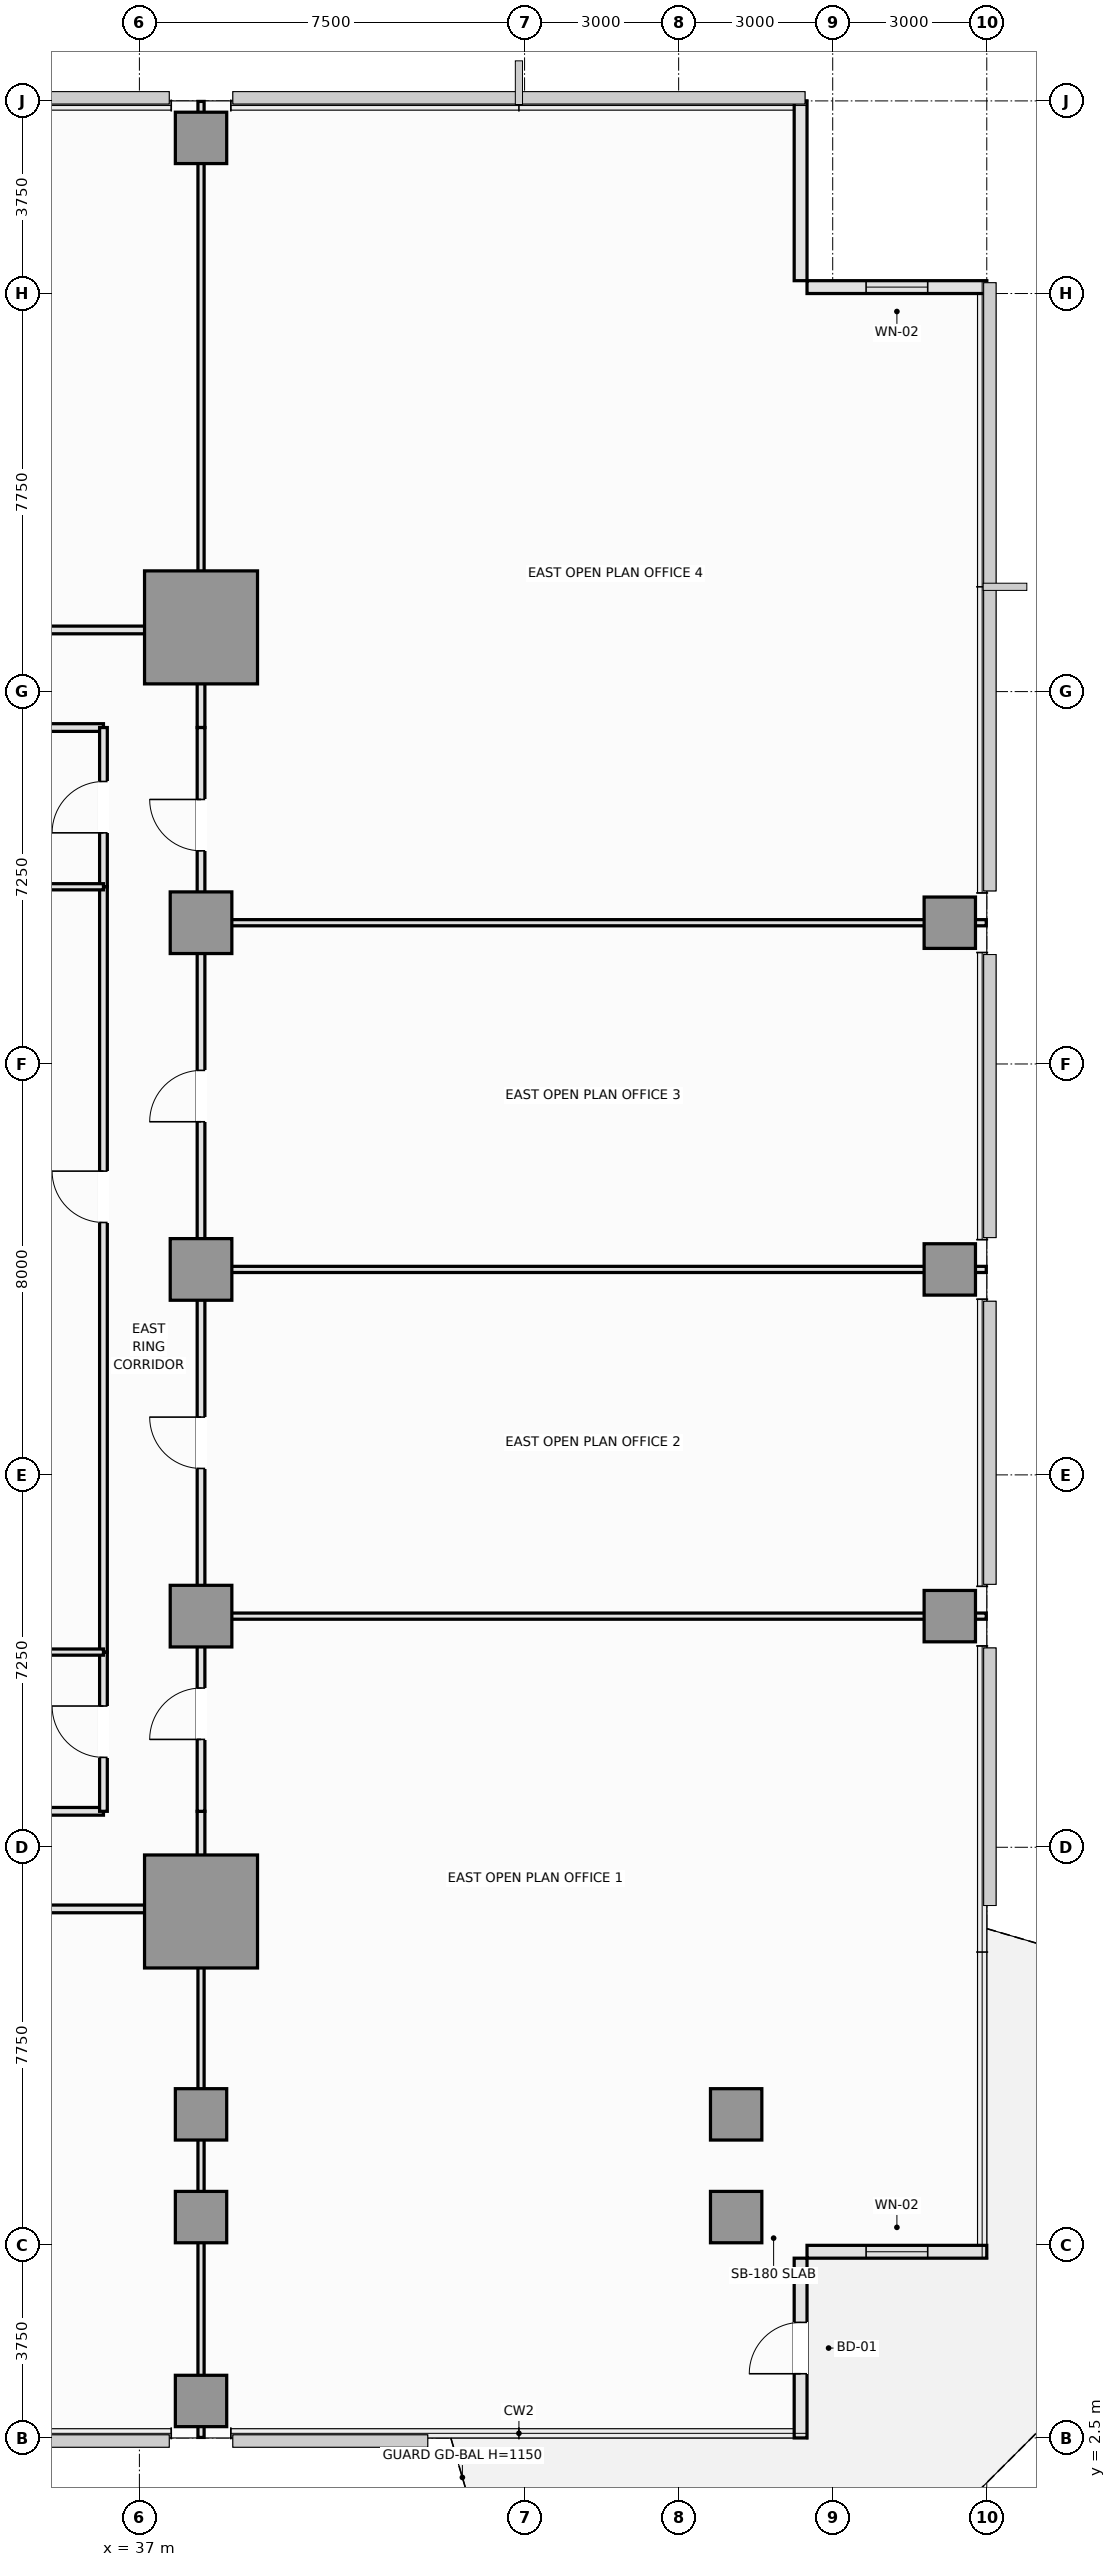
"""IFC4 building model, lengths in metres.
Left out: names, types, materials, properties, quantities, classifications, styles, units other than length and angle.
Written with IfcOpenShell. Run it as: python <this file> out.ifc"""

import sys

from ifc_helpers import new_model, si_unit, direction, frame, frame_2d, origin, origin_2d, place, context, subcontext, project, spatial, rectangle, extrude, element, fill, save


model = new_model("IFC4")
c1 = context("Model", 3, precision=1e-05, world=origin(), true_north=direction((0.0, 1.0)))
c2 = subcontext(c1, "Body", "Model", "MODEL_VIEW")
j1 = project(units=[si_unit("LENGTHUNIT", "METRE"), si_unit("PLANEANGLEUNIT", "RADIAN")], contexts=[c1])
p1 = place(None, origin())
s1 = spatial("IfcSite", under=j1, at=p1, CompositionType="ELEMENT")
p2 = place(p1, origin())
s2 = spatial("IfcBuilding", under=s1, at=p2, CompositionType="ELEMENT")
p3 = place(p2, frame((0.0, 0.0, 32.7)))
s3 = spatial("IfcBuildingStorey", under=s2, at=p3, CompositionType="ELEMENT", Elevation=32.7)
for number, where, z_axis, x_axis in (
    (1, (38.2, 12.75, 0.0), (0.0, 0.0, 1.0), (1.0, 0.0, 0.0)),
    (2, (38.2, 37.75, 0.0), (0.0, 0.0, 1.0), (1.0, 0.0, 0.0)),
):
    element("IfcColumn", number, at=place(p3, frame(where, z_axis=z_axis, x_axis=x_axis)), inside=s3, PredefinedType="COLUMN", context=c2, shape_type="SweptSolid", body=[
        extrude(rectangle(XDim=2.2, YDim=2.2, at=origin_2d()), origin(), (0.0, 0.0, 1.0), 3.55),
    ])
for number, where, z_axis, x_axis in (
    (3, (38.2, 18.5, 0.0), (0.0, 0.0, 1.0), (1.0, 0.0, 0.0)),
    (4, (38.2, 25.25, 0.0), (0.0, 0.0, 1.0), (1.0, 0.0, 0.0)),
    (5, (38.2, 32.0, 0.0), (0.0, 0.0, 1.0), (1.0, 0.0, 0.0)),
):
    element("IfcColumn", number, at=place(p3, frame(where, z_axis=z_axis, x_axis=x_axis)), inside=s3, PredefinedType="COLUMN", context=c2, shape_type="SweptSolid", body=[
        extrude(rectangle(XDim=1.2, YDim=1.2, at=origin_2d()), origin(), (0.0, 0.0, 1.0), 3.55),
    ])
for number, where, z_axis, x_axis in (
    (6, (48.62, 6.8, 0.0), (0.0, 0.0, 1.0), (1.0, 0.0, 0.0)),
    (7, (38.2, 6.8, 0.0), (0.0, 0.0, 1.0), (1.0, 0.0, 0.0)),
    (8, (38.2, 8.8, 0.0), (0.0, 0.0, 1.0), (1.0, 0.0, 0.0)),
    (9, (48.62, 8.8, 0.0), (0.0, 0.0, 1.0), (1.0, 0.0, 0.0)),
    (10, (52.78, 18.5, 0.0), (0.0, 0.0, 1.0), (1.0, 0.0, 0.0)),
    (11, (52.78, 25.25, 0.0), (0.0, 0.0, 1.0), (1.0, 0.0, 0.0)),
    (12, (52.78, 32.0, 0.0), (0.0, 0.0, 1.0), (1.0, 0.0, 0.0)),
    (13, (38.2, 3.22, 0.0), (0.0, 0.0, 1.0), (1.0, 0.0, 0.0)),
    (14, (38.2, 47.28, 0.0), (0.0, 0.0, 1.0), (1.0, 0.0, 0.0)),
):
    element("IfcColumn", number, at=place(p3, frame(where, z_axis=z_axis, x_axis=x_axis)), inside=s3, PredefinedType="COLUMN", context=c2, shape_type="SweptSolid", body=[
        extrude(rectangle(XDim=1.0, YDim=1.0, at=origin_2d()), origin(), (0.0, 0.0, 1.0), 3.55),
    ])
p4 = place(p3, frame((49.875, 2.5, 0.0), z_axis=(0.0, 0.0, 1.0), x_axis=(0.0, 1.0, 0.0)))
e15 = element("IfcWall", 15, at=p4, inside=s3, PredefinedType="SOLIDWALL", context=c2, shape_type="SweptSolid", body=[
    extrude(rectangle(XDim=3.5, YDim=0.25, at=frame_2d((1.75, 0.0))), origin(), (0.0, 0.0, 1.0), 3.07),
])
p5 = place(p4, frame((1.25, 0.0, 0.0)))
e16 = element("IfcOpeningElement", 16, at=p5, cuts=e15, PredefinedType="OPENING", context=c2, shape_type="SweptSolid", body=[
    extrude(rectangle(XDim=1.0, YDim=2.2, at=frame_2d((0.5, 1.1))), frame((0.0, 0.135, 0.0), z_axis=(0.0, -1.0, 0.0), x_axis=(1.0, 0.0, 0.0)), (0.0, 0.0, 1.0), 0.27),
])
p6 = place(p3, frame((50.0, 6.125, 0.0), z_axis=(0.0, 0.0, 1.0), x_axis=(1.0, 0.0, 0.0)))
e17 = element("IfcWall", 17, at=p6, inside=s3, PredefinedType="SOLIDWALL", context=c2, shape_type="SweptSolid", body=[
    extrude(rectangle(XDim=3.5, YDim=0.25, at=frame_2d((1.75, 0.0))), origin(), (0.0, 0.0, 1.0), 3.07),
])
p7 = place(p6, frame((1.15, 0.0, 0.9)))
e18 = element("IfcOpeningElement", 18, at=p7, cuts=e17, PredefinedType="OPENING", context=c2, shape_type="SweptSolid", body=[
    extrude(rectangle(XDim=1.2, YDim=1.8, at=frame_2d((0.6, 0.9))), frame((0.0, 0.135, 0.0), z_axis=(0.0, -1.0, 0.0), x_axis=(1.0, 0.0, 0.0)), (0.0, 0.0, 1.0), 0.27),
])
p8 = place(p3, frame((53.5, 44.375, 0.0), z_axis=(0.0, 0.0, 1.0), x_axis=(-1.0, 0.0, 0.0)))
e19 = element("IfcWall", 19, at=p8, inside=s3, PredefinedType="SOLIDWALL", context=c2, shape_type="SweptSolid", body=[
    extrude(rectangle(XDim=3.5, YDim=0.25, at=frame_2d((1.75, 0.0))), origin(), (0.0, 0.0, 1.0), 3.37),
])
p9 = place(p8, frame((1.15, 0.0, 0.9)))
e20 = element("IfcOpeningElement", 20, at=p9, cuts=e19, PredefinedType="OPENING", context=c2, shape_type="SweptSolid", body=[
    extrude(rectangle(XDim=1.2, YDim=1.8, at=frame_2d((0.6, 0.9))), frame((0.0, 0.135, 0.0), z_axis=(0.0, -1.0, 0.0), x_axis=(1.0, 0.0, 0.0)), (0.0, 0.0, 1.0), 0.27),
])
p10 = place(p3, frame((49.875, 44.5, 0.0), z_axis=(0.0, 0.0, 1.0), x_axis=(0.0, 1.0, 0.0)))
e21 = element("IfcWall", 21, at=p10, inside=s3, PredefinedType="SOLIDWALL", context=c2, shape_type="SweptSolid", body=[
    extrude(rectangle(XDim=3.5, YDim=0.25, at=frame_2d((1.75, 0.0))), origin(), (0.0, 0.0, 1.0), 3.37),
])
p11 = place(p3, frame((29.8, 14.7, 0.0), z_axis=(0.0, 0.0, 1.0), x_axis=(1.0, 0.0, 0.0)))
e22 = element("IfcWall", 22, at=p11, inside=s3, PredefinedType="PARTITIONING", context=c2, shape_type="SweptSolid", body=[
    extrude(rectangle(XDim=6.5, YDim=0.15, at=frame_2d((3.25, 0.0))), origin(), (0.0, 0.0, 1.0), 3.37),
])
p12 = place(p3, frame((27.5, 12.8, 0.0), z_axis=(0.0, 0.0, 1.0), x_axis=(1.0, 0.0, 0.0)))
e23 = element("IfcWall", 23, at=p12, inside=s3, PredefinedType="PARTITIONING", context=c2, shape_type="SweptSolid", body=[
    extrude(rectangle(XDim=10.7, YDim=0.15, at=frame_2d((5.35, 0.0))), origin(), (0.0, 0.0, 1.0), 2.72),
])
p13 = place(p12, frame((4.85, 0.0, 0.0)))
e24 = element("IfcOpeningElement", 24, at=p13, cuts=e23, PredefinedType="OPENING", context=c2, shape_type="SweptSolid", body=[
    extrude(rectangle(XDim=1.0, YDim=2.15, at=frame_2d((0.5, 1.075))), frame((0.0, 0.085, 0.0), z_axis=(0.0, -1.0, 0.0), x_axis=(1.0, 0.0, 0.0)), (0.0, 0.0, 1.0), 0.17),
])
p14 = place(p3, frame((38.2, 12.8, 0.0), z_axis=(0.0, 0.0, 1.0), x_axis=(0.0, 1.0, 0.0)))
e25 = element("IfcWall", 25, at=p14, inside=s3, PredefinedType="PARTITIONING", context=c2, shape_type="SweptSolid", body=[
    extrude(rectangle(XDim=1.9, YDim=0.15, at=frame_2d((0.95, 0.0))), origin(), (0.0, 0.0, 1.0), 2.82),
])
p15 = place(p3, frame((29.8, 35.8, 0.0), z_axis=(0.0, 0.0, 1.0), x_axis=(1.0, 0.0, 0.0)))
e26 = element("IfcWall", 26, at=p15, inside=s3, PredefinedType="PARTITIONING", context=c2, shape_type="SweptSolid", body=[
    extrude(rectangle(XDim=6.5, YDim=0.15, at=frame_2d((3.25, 0.0))), origin(), (0.0, 0.0, 1.0), 3.37),
])
p16 = place(p3, frame((27.5, 37.7, 0.0), z_axis=(0.0, 0.0, 1.0), x_axis=(1.0, 0.0, 0.0)))
e27 = element("IfcWall", 27, at=p16, inside=s3, PredefinedType="PARTITIONING", context=c2, shape_type="SweptSolid", body=[
    extrude(rectangle(XDim=10.7, YDim=0.15, at=frame_2d((5.35, 0.0))), origin(), (0.0, 0.0, 1.0), 2.72),
])
p17 = place(p16, frame((4.85, 0.0, 0.0)))
e28 = element("IfcOpeningElement", 28, at=p17, cuts=e27, PredefinedType="OPENING", context=c2, shape_type="SweptSolid", body=[
    extrude(rectangle(XDim=1.0, YDim=2.15, at=frame_2d((0.5, 1.075))), frame((0.0, 0.085, 0.0), z_axis=(0.0, -1.0, 0.0), x_axis=(1.0, 0.0, 0.0)), (0.0, 0.0, 1.0), 0.17),
])
p18 = place(p3, frame((38.2, 35.8, 0.0), z_axis=(0.0, 0.0, 1.0), x_axis=(0.0, 1.0, 0.0)))
e29 = element("IfcWall", 29, at=p18, inside=s3, PredefinedType="PARTITIONING", context=c2, shape_type="SweptSolid", body=[
    extrude(rectangle(XDim=1.9, YDim=0.15, at=frame_2d((0.95, 0.0))), origin(), (0.0, 0.0, 1.0), 2.82),
])
p19 = place(p3, frame((36.3, 14.7, 0.0), z_axis=(0.0, 0.0, 1.0), x_axis=(0.0, 1.0, 0.0)))
e30 = element("IfcWall", 30, at=p19, inside=s3, PredefinedType="PARTITIONING", context=c2, shape_type="SweptSolid", body=[
    extrude(rectangle(XDim=3.1, YDim=0.15, at=frame_2d((1.55, 0.0))), origin(), (0.0, 0.0, 1.0), 3.37),
])
p20 = place(p19, frame((1.05, 0.0, 0.0)))
e31 = element("IfcOpeningElement", 31, at=p20, cuts=e30, PredefinedType="OPENING", context=c2, shape_type="SweptSolid", body=[
    extrude(rectangle(XDim=1.0, YDim=2.15, at=frame_2d((0.5, 1.075))), frame((0.0, 0.085, 0.0), z_axis=(0.0, -1.0, 0.0), x_axis=(1.0, 0.0, 0.0)), (0.0, 0.0, 1.0), 0.17),
])
p21 = place(p3, frame((36.3, 32.7, 0.0), z_axis=(0.0, 0.0, 1.0), x_axis=(0.0, 1.0, 0.0)))
e32 = element("IfcWall", 32, at=p21, inside=s3, PredefinedType="PARTITIONING", context=c2, shape_type="SweptSolid", body=[
    extrude(rectangle(XDim=3.1, YDim=0.15, at=frame_2d((1.55, 0.0))), origin(), (0.0, 0.0, 1.0), 3.37),
])
p22 = place(p21, frame((1.05, 0.0, 0.0)))
e33 = element("IfcOpeningElement", 33, at=p22, cuts=e32, PredefinedType="OPENING", context=c2, shape_type="SweptSolid", body=[
    extrude(rectangle(XDim=1.0, YDim=2.15, at=frame_2d((0.5, 1.075))), frame((0.0, 0.085, 0.0), z_axis=(0.0, -1.0, 0.0), x_axis=(1.0, 0.0, 0.0)), (0.0, 0.0, 1.0), 0.17),
])
p23 = place(p3, frame((36.3, 17.8, 0.0), z_axis=(0.0, 0.0, 1.0), x_axis=(0.0, 1.0, 0.0)))
e34 = element("IfcWall", 34, at=p23, inside=s3, PredefinedType="PARTITIONING", context=c2, shape_type="SweptSolid", body=[
    extrude(rectangle(XDim=14.9, YDim=0.15, at=frame_2d((7.45, 0.0))), origin(), (0.0, 0.0, 1.0), 3.37),
])
p24 = place(p23, frame((8.364, 0.0, 0.0)))
e35 = element("IfcOpeningElement", 35, at=p24, cuts=e34, PredefinedType="OPENING", context=c2, shape_type="SweptSolid", body=[
    extrude(rectangle(XDim=1.0, YDim=2.15, at=frame_2d((0.5, 1.075))), frame((0.0, 0.085, 0.0), z_axis=(0.0, -1.0, 0.0), x_axis=(1.0, 0.0, 0.0)), (0.0, 0.0, 1.0), 0.17),
])
p25 = place(p3, frame((38.2, 14.7, 0.0), z_axis=(0.0, 0.0, 1.0), x_axis=(0.0, 1.0, 0.0)))
e36 = element("IfcWall", 36, at=p25, inside=s3, PredefinedType="PARTITIONING", context=c2, shape_type="SweptSolid", body=[
    extrude(rectangle(XDim=3.8, YDim=0.15, at=frame_2d((1.9, 0.0))), origin(), (0.0, 0.0, 1.0), 2.82),
])
p26 = place(p25, frame((1.4, 0.0, 0.0)))
e37 = element("IfcOpeningElement", 37, at=p26, cuts=e36, PredefinedType="OPENING", context=c2, shape_type="SweptSolid", body=[
    extrude(rectangle(XDim=1.0, YDim=2.15, at=frame_2d((0.5, 1.075))), frame((0.0, 0.085, 0.0), z_axis=(0.0, -1.0, 0.0), x_axis=(1.0, 0.0, 0.0)), (0.0, 0.0, 1.0), 0.17),
])
p27 = place(p3, frame((38.2, 18.5, 0.0), z_axis=(0.0, 0.0, 1.0), x_axis=(0.0, 1.0, 0.0)))
e38 = element("IfcWall", 38, at=p27, inside=s3, PredefinedType="PARTITIONING", context=c2, shape_type="SweptSolid", body=[
    extrude(rectangle(XDim=6.75, YDim=0.15, at=frame_2d((3.375, 0.0))), origin(), (0.0, 0.0, 1.0), 2.82),
])
p28 = place(p27, frame((2.875, 0.0, 0.0)))
e39 = element("IfcOpeningElement", 39, at=p28, cuts=e38, PredefinedType="OPENING", context=c2, shape_type="SweptSolid", body=[
    extrude(rectangle(XDim=1.0, YDim=2.15, at=frame_2d((0.5, 1.075))), frame((0.0, 0.085, 0.0), z_axis=(0.0, -1.0, 0.0), x_axis=(1.0, 0.0, 0.0)), (0.0, 0.0, 1.0), 0.17),
])
p29 = place(p3, frame((38.2, 25.25, 0.0), z_axis=(0.0, 0.0, 1.0), x_axis=(0.0, 1.0, 0.0)))
e40 = element("IfcWall", 40, at=p29, inside=s3, PredefinedType="PARTITIONING", context=c2, shape_type="SweptSolid", body=[
    extrude(rectangle(XDim=6.75, YDim=0.15, at=frame_2d((3.375, 0.0))), origin(), (0.0, 0.0, 1.0), 2.82),
])
p30 = place(p29, frame((2.875, 0.0, 0.0)))
e41 = element("IfcOpeningElement", 41, at=p30, cuts=e40, PredefinedType="OPENING", context=c2, shape_type="SweptSolid", body=[
    extrude(rectangle(XDim=1.0, YDim=2.15, at=frame_2d((0.5, 1.075))), frame((0.0, 0.085, 0.0), z_axis=(0.0, -1.0, 0.0), x_axis=(1.0, 0.0, 0.0)), (0.0, 0.0, 1.0), 0.17),
])
p31 = place(p3, frame((38.2, 32.0, 0.0), z_axis=(0.0, 0.0, 1.0), x_axis=(0.0, 1.0, 0.0)))
e42 = element("IfcWall", 42, at=p31, inside=s3, PredefinedType="PARTITIONING", context=c2, shape_type="SweptSolid", body=[
    extrude(rectangle(XDim=3.8, YDim=0.15, at=frame_2d((1.9, 0.0))), origin(), (0.0, 0.0, 1.0), 2.82),
])
p32 = place(p31, frame((1.4, 0.0, 0.0)))
e43 = element("IfcOpeningElement", 43, at=p32, cuts=e42, PredefinedType="OPENING", context=c2, shape_type="SweptSolid", body=[
    extrude(rectangle(XDim=1.0, YDim=2.15, at=frame_2d((0.5, 1.075))), frame((0.0, 0.085, 0.0), z_axis=(0.0, -1.0, 0.0), x_axis=(1.0, 0.0, 0.0)), (0.0, 0.0, 1.0), 0.17),
])
for number, where, z_axis, x_axis in (
    (44, (29.8, 17.8, 0.0), (0.0, 0.0, 1.0), (1.0, 0.0, 0.0)),
    (45, (29.8, 32.7, 0.0), (0.0, 0.0, 1.0), (1.0, 0.0, 0.0)),
):
    element("IfcWall", number, at=place(p3, frame(where, z_axis=z_axis, x_axis=x_axis)), inside=s3, PredefinedType="PARTITIONING", context=c2, shape_type="SweptSolid", body=[
        extrude(rectangle(XDim=6.5, YDim=0.12, at=frame_2d((3.25, 0.0))), origin(), (0.0, 0.0, 1.0), 3.37),
    ])
for number, where, z_axis, x_axis in (
    (46, (38.2, 2.51, 0.0), (0.0, 0.0, 1.0), (0.0, 1.0, 0.0)),
    (47, (38.2, 37.7, 0.0), (0.0, 0.0, 1.0), (0.0, 1.0, 0.0)),
):
    element("IfcWall", number, at=place(p3, frame(where, z_axis=z_axis, x_axis=x_axis)), inside=s3, PredefinedType="PARTITIONING", context=c2, shape_type="SweptSolid", body=[
        extrude(rectangle(XDim=10.29, YDim=0.12, at=frame_2d((5.145, 0.0))), origin(), (0.0, 0.0, 1.0), 2.82),
    ])
for number, where, z_axis, x_axis in (
    (48, (38.2, 18.5, 0.0), (0.0, 0.0, 1.0), (1.0, 0.0, 0.0)),
    (49, (38.2, 25.25, 0.0), (0.0, 0.0, 1.0), (1.0, 0.0, 0.0)),
    (50, (38.2, 32.0, 0.0), (0.0, 0.0, 1.0), (1.0, 0.0, 0.0)),
):
    element("IfcWall", number, at=place(p3, frame(where, z_axis=z_axis, x_axis=x_axis)), inside=s3, PredefinedType="PARTITIONING", context=c2, shape_type="SweptSolid", body=[
        extrude(rectangle(XDim=15.29, YDim=0.12, at=frame_2d((7.645, 0.0))), origin(), (0.0, 0.0, 1.0), 2.72),
    ])
p33 = place(p5, frame((1.0, 0.0, 0.0), z_axis=(0.0, 0.0, 1.0), x_axis=(-1.0, 0.0, 0.0)))
e51 = element("IfcDoor", 51, at=p33, inside=s3, OperationType="SINGLE_SWING_LEFT", PredefinedType="DOOR", context=c2, shape_type="SweptSolid", body=[
    extrude(rectangle(XDim=1.0, YDim=2.2, at=frame_2d((0.5, 1.1))), frame((0.0, 0.025, 0.0), z_axis=(0.0, -1.0, 0.0), x_axis=(1.0, 0.0, 0.0)), (0.0, 0.0, 1.0), 0.05),
])
fill(e16, e51)
p34 = place(p7, origin())
e52 = element("IfcWindow", 52, at=p34, inside=s3, PartitioningType="SINGLE_PANEL", PredefinedType="WINDOW", context=c2, shape_type="SweptSolid", body=[
    extrude(rectangle(XDim=1.2, YDim=1.8, at=frame_2d((0.6, 0.9))), frame((0.0, 0.03, 0.0), z_axis=(0.0, -1.0, 0.0), x_axis=(1.0, 0.0, 0.0)), (0.0, 0.0, 1.0), 0.06),
])
fill(e18, e52)
p35 = place(p9, origin())
e53 = element("IfcWindow", 53, at=p35, inside=s3, PartitioningType="SINGLE_PANEL", PredefinedType="WINDOW", context=c2, shape_type="SweptSolid", body=[
    extrude(rectangle(XDim=1.2, YDim=1.8, at=frame_2d((0.6, 0.9))), frame((0.0, 0.03, 0.0), z_axis=(0.0, -1.0, 0.0), x_axis=(1.0, 0.0, 0.0)), (0.0, 0.0, 1.0), 0.06),
])
fill(e20, e53)
p36 = place(p20, origin())
e54 = element("IfcDoor", 54, at=p36, inside=s3, OperationType="SINGLE_SWING_RIGHT", PredefinedType="DOOR", context=c2, shape_type="SweptSolid", body=[
    extrude(rectangle(XDim=1.0, YDim=2.15, at=frame_2d((0.5, 1.075))), frame((0.0, 0.025, 0.0), z_axis=(0.0, -1.0, 0.0), x_axis=(1.0, 0.0, 0.0)), (0.0, 0.0, 1.0), 0.05),
])
fill(e31, e54)
p37 = place(p22, origin())
e55 = element("IfcDoor", 55, at=p37, inside=s3, OperationType="SINGLE_SWING_LEFT", PredefinedType="DOOR", context=c2, shape_type="SweptSolid", body=[
    extrude(rectangle(XDim=1.0, YDim=2.15, at=frame_2d((0.5, 1.075))), frame((0.0, 0.025, 0.0), z_axis=(0.0, -1.0, 0.0), x_axis=(1.0, 0.0, 0.0)), (0.0, 0.0, 1.0), 0.05),
])
fill(e33, e55)
p38 = place(p24, origin())
e56 = element("IfcDoor", 56, at=p38, inside=s3, OperationType="SINGLE_SWING_RIGHT", PredefinedType="DOOR", context=c2, shape_type="SweptSolid", body=[
    extrude(rectangle(XDim=1.0, YDim=2.15, at=frame_2d((0.5, 1.075))), frame((0.0, 0.025, 0.0), z_axis=(0.0, -1.0, 0.0), x_axis=(1.0, 0.0, 0.0)), (0.0, 0.0, 1.0), 0.05),
])
fill(e35, e56)
p39 = place(p26, origin())
e57 = element("IfcDoor", 57, at=p39, inside=s3, OperationType="SINGLE_SWING_LEFT", PredefinedType="DOOR", context=c2, shape_type="SweptSolid", body=[
    extrude(rectangle(XDim=1.0, YDim=2.15, at=frame_2d((0.5, 1.075))), frame((0.0, 0.025, 0.0), z_axis=(0.0, -1.0, 0.0), x_axis=(1.0, 0.0, 0.0)), (0.0, 0.0, 1.0), 0.05),
])
fill(e37, e57)
p40 = place(p28, origin())
e58 = element("IfcDoor", 58, at=p40, inside=s3, OperationType="SINGLE_SWING_RIGHT", PredefinedType="DOOR", context=c2, shape_type="SweptSolid", body=[
    extrude(rectangle(XDim=1.0, YDim=2.15, at=frame_2d((0.5, 1.075))), frame((0.0, 0.025, 0.0), z_axis=(0.0, -1.0, 0.0), x_axis=(1.0, 0.0, 0.0)), (0.0, 0.0, 1.0), 0.05),
])
fill(e39, e58)
p41 = place(p30, origin())
e59 = element("IfcDoor", 59, at=p41, inside=s3, OperationType="SINGLE_SWING_LEFT", PredefinedType="DOOR", context=c2, shape_type="SweptSolid", body=[
    extrude(rectangle(XDim=1.0, YDim=2.15, at=frame_2d((0.5, 1.075))), frame((0.0, 0.025, 0.0), z_axis=(0.0, -1.0, 0.0), x_axis=(1.0, 0.0, 0.0)), (0.0, 0.0, 1.0), 0.05),
])
fill(e41, e59)
p42 = place(p32, origin())
e60 = element("IfcDoor", 60, at=p42, inside=s3, OperationType="SINGLE_SWING_RIGHT", PredefinedType="DOOR", context=c2, shape_type="SweptSolid", body=[
    extrude(rectangle(XDim=1.0, YDim=2.15, at=frame_2d((0.5, 1.075))), frame((0.0, 0.025, 0.0), z_axis=(0.0, -1.0, 0.0), x_axis=(1.0, 0.0, 0.0)), (0.0, 0.0, 1.0), 0.05),
])
fill(e43, e60)
save(model, sys.argv[1])
